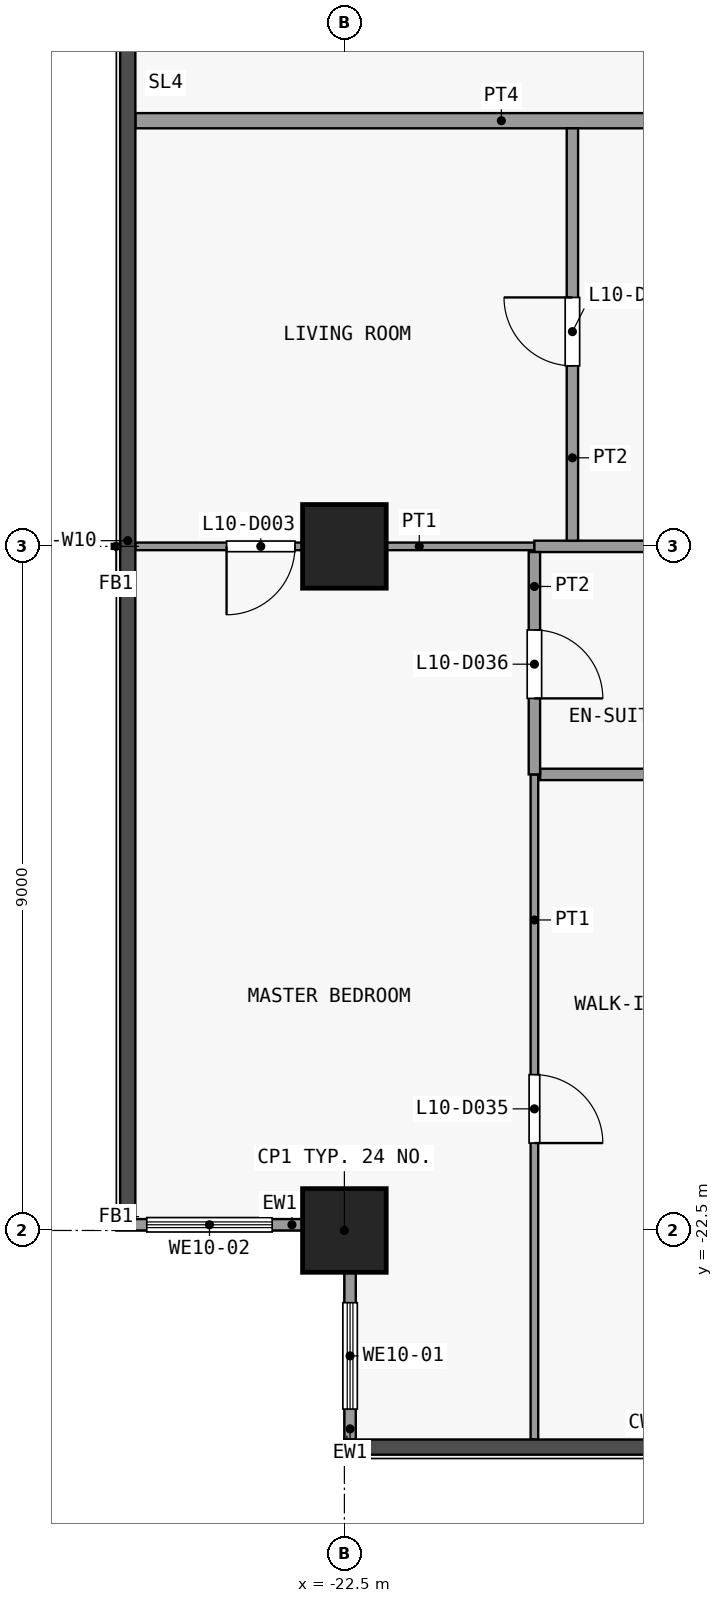
"""IFC4 building model, lengths in metres.
Left out: names, types, materials, properties, quantities, classifications, styles, units other than length and angle.
Written with IfcOpenShell. Run it as: python <this file> out.ifc"""

import sys

from ifc_helpers import new_model, si_unit, direction, frame, frame_2d, origin, origin_2d, place, context, subcontext, project, spatial, rectangle, extrude, element, fill, save


model = new_model("IFC4")
c1 = context("Model", 3, precision=1e-05, world=origin(), true_north=direction((0.0, 1.0)))
c2 = subcontext(c1, "Body", "Model", "MODEL_VIEW")
j1 = project(units=[si_unit("LENGTHUNIT", "METRE"), si_unit("PLANEANGLEUNIT", "RADIAN")], contexts=[c1])
p1 = place(None, origin())
s1 = spatial("IfcSite", under=j1, at=p1, CompositionType="ELEMENT")
p2 = place(p1, origin())
s2 = spatial("IfcBuilding", under=s1, at=p2, CompositionType="ELEMENT")
p3 = place(p2, frame((0.0, 0.0, 46.9)))
s3 = spatial("IfcBuildingStorey", under=s2, at=p3, CompositionType="ELEMENT", Elevation=46.9)
for number, where, z_axis, x_axis in (
    (1, (-22.5, -22.5, 0.0), (0.0, 0.0, 1.0), (1.0, 0.0, 0.0)),
    (2, (-22.5, -13.5, 0.0), (0.0, 0.0, 1.0), (1.0, 0.0, 0.0)),
):
    element("IfcColumn", number, at=place(p3, frame(where, z_axis=z_axis, x_axis=x_axis)), inside=s3, PredefinedType="COLUMN", context=c2, shape_type="SweptSolid", body=[
        extrude(rectangle(XDim=1.1, YDim=1.1, at=origin_2d()), origin(), (0.0, 0.0, 1.0), 3.6),
    ])
p4 = place(p3, frame((-22.425, -25.25, 0.0), z_axis=(0.0, 0.0, 1.0), x_axis=(0.0, 1.0, 0.0)))
e3 = element("IfcWall", 3, at=p4, inside=s3, PredefinedType="SOLIDWALL", context=c2, shape_type="SweptSolid", body=[
    extrude(rectangle(XDim=2.2, YDim=0.15, at=frame_2d((1.1, 0.0))), origin(), (0.0, 0.0, 1.0), 3.3),
])
p5 = place(p4, frame((0.4, 0.0, 0.9)))
e4 = element("IfcOpeningElement", 4, at=p5, cuts=e3, PredefinedType="OPENING", context=c2, shape_type="SweptSolid", body=[
    extrude(rectangle(XDim=1.4, YDim=2.4, at=frame_2d((0.7, 1.2))), frame((0.0, 0.085, 0.0), z_axis=(0.0, -1.0, 0.0), x_axis=(1.0, 0.0, 0.0)), (0.0, 0.0, 1.0), 0.17),
])
p6 = place(p3, frame((-23.05, -22.425, 0.0), z_axis=(0.0, 0.0, 1.0), x_axis=(-1.0, 0.0, 0.0)))
e5 = element("IfcWall", 5, at=p6, inside=s3, PredefinedType="SOLIDWALL", context=c2, shape_type="SweptSolid", body=[
    extrude(rectangle(XDim=2.45, YDim=0.15, at=frame_2d((1.225, 0.0))), origin(), (0.0, 0.0, 1.0), 3.3),
])
p7 = place(p6, frame((0.4, 0.0, 0.9)))
e6 = element("IfcOpeningElement", 6, at=p7, cuts=e5, PredefinedType="OPENING", context=c2, shape_type="SweptSolid", body=[
    extrude(rectangle(XDim=1.65, YDim=2.4, at=frame_2d((0.825, 1.2))), frame((0.0, 0.085, 0.0), z_axis=(0.0, -1.0, 0.0), x_axis=(1.0, 0.0, 0.0)), (0.0, 0.0, 1.0), 0.17),
])
p8 = place(p3, frame((-19.925, -16.5, 0.0), z_axis=(0.0, 0.0, 1.0), x_axis=(1.0, 0.0, 0.0)))
e7 = element("IfcWall", 7, at=p8, inside=s3, PredefinedType="PARTITIONING", context=c2, shape_type="SweptSolid", body=[
    extrude(rectangle(XDim=3.35, YDim=0.15, at=frame_2d((1.675, 0.0))), origin(), (0.0, 0.0, 1.0), 3.3),
])
p9 = place(p3, frame((-25.25, -13.5, 0.0), z_axis=(0.0, 0.0, 1.0), x_axis=(1.0, 0.0, 0.0)))
e8 = element("IfcWall", 8, at=p9, inside=s3, PredefinedType="PARTITIONING", context=c2, shape_type="SweptSolid", body=[
    extrude(rectangle(XDim=5.25, YDim=0.1, at=frame_2d((2.625, 0.0))), origin(), (0.0, 0.0, 1.0), 3.3),
])
p10 = place(p9, frame((1.2, 0.0, 0.0)))
e9 = element("IfcOpeningElement", 9, at=p10, cuts=e8, PredefinedType="OPENING", context=c2, shape_type="SweptSolid", body=[
    extrude(rectangle(XDim=0.9, YDim=2.1, at=frame_2d((0.45, 1.05))), frame((0.0, 0.06, 0.0), z_axis=(0.0, -1.0, 0.0), x_axis=(1.0, 0.0, 0.0)), (0.0, 0.0, 1.0), 0.12),
])
p11 = place(p3, frame((-20.0, -13.5, 0.0), z_axis=(0.0, 0.0, 1.0), x_axis=(1.0, 0.0, 0.0)))
e10 = element("IfcWall", 10, at=p11, inside=s3, PredefinedType="PARTITIONING", context=c2, shape_type="SweptSolid", body=[
    extrude(rectangle(XDim=3.425, YDim=0.15, at=frame_2d((1.712, 0.0))), origin(), (0.0, 0.0, 1.0), 3.3),
])
p12 = place(p3, frame((-25.25, -7.9, 0.0), z_axis=(0.0, 0.0, 1.0), x_axis=(1.0, 0.0, 0.0)))
e11 = element("IfcWall", 11, at=p12, inside=s3, PredefinedType="PARTITIONING", context=c2, shape_type="SweptSolid", body=[
    extrude(rectangle(XDim=11.75, YDim=0.2, at=frame_2d((5.875, 0.0))), origin(), (0.0, 0.0, 1.0), 3.3),
])
p13 = place(p12, frame((9.75, 0.0, 0.0)))
e12 = element("IfcOpeningElement", 12, at=p13, cuts=e11, PredefinedType="OPENING", context=c2, shape_type="SweptSolid", body=[
    extrude(rectangle(XDim=1.0, YDim=2.1, at=frame_2d((0.5, 1.05))), frame((0.0, 0.11, 0.0), z_axis=(0.0, -1.0, 0.0), x_axis=(1.0, 0.0, 0.0)), (0.0, 0.0, 1.0), 0.22),
])
p14 = place(p3, frame((-20.0, -25.25, 0.0), z_axis=(0.0, 0.0, 1.0), x_axis=(0.0, 1.0, 0.0)))
e13 = element("IfcWall", 13, at=p14, inside=s3, PredefinedType="PARTITIONING", context=c2, shape_type="SweptSolid", body=[
    extrude(rectangle(XDim=8.75, YDim=0.1, at=frame_2d((4.375, 0.0))), origin(), (0.0, 0.0, 1.0), 3.3),
])
p15 = place(p14, frame((3.9, 0.0, 0.0)))
e14 = element("IfcOpeningElement", 14, at=p15, cuts=e13, PredefinedType="OPENING", context=c2, shape_type="SweptSolid", body=[
    extrude(rectangle(XDim=0.9, YDim=2.1, at=frame_2d((0.45, 1.05))), frame((0.0, 0.06, 0.0), z_axis=(0.0, -1.0, 0.0), x_axis=(1.0, 0.0, 0.0)), (0.0, 0.0, 1.0), 0.12),
])
p16 = place(p3, frame((-20.0, -16.5, 0.0), z_axis=(0.0, 0.0, 1.0), x_axis=(0.0, 1.0, 0.0)))
e15 = element("IfcWall", 15, at=p16, inside=s3, PredefinedType="PARTITIONING", context=c2, shape_type="SweptSolid", body=[
    extrude(rectangle(XDim=2.925, YDim=0.15, at=frame_2d((1.462, 0.0))), origin(), (0.0, 0.0, 1.0), 3.3),
])
p17 = place(p16, frame((1.0, 0.0, 0.0)))
e16 = element("IfcOpeningElement", 16, at=p17, cuts=e15, PredefinedType="OPENING", context=c2, shape_type="SweptSolid", body=[
    extrude(rectangle(XDim=0.9, YDim=2.1, at=frame_2d((0.45, 1.05))), frame((0.0, 0.085, 0.0), z_axis=(0.0, -1.0, 0.0), x_axis=(1.0, 0.0, 0.0)), (0.0, 0.0, 1.0), 0.17),
])
p18 = place(p3, frame((-19.5, -13.425, 0.0), z_axis=(0.0, 0.0, 1.0), x_axis=(0.0, 1.0, 0.0)))
e17 = element("IfcWall", 17, at=p18, inside=s3, PredefinedType="PARTITIONING", context=c2, shape_type="SweptSolid", body=[
    extrude(rectangle(XDim=5.425, YDim=0.15, at=frame_2d((2.712, 0.0))), origin(), (0.0, 0.0, 1.0), 3.3),
])
p19 = place(p18, frame((2.3, 0.0, 0.0)))
e18 = element("IfcOpeningElement", 18, at=p19, cuts=e17, PredefinedType="OPENING", context=c2, shape_type="SweptSolid", body=[
    extrude(rectangle(XDim=0.9, YDim=2.1, at=frame_2d((0.45, 1.05))), frame((0.0, 0.085, 0.0), z_axis=(0.0, -1.0, 0.0), x_axis=(1.0, 0.0, 0.0)), (0.0, 0.0, 1.0), 0.17),
])
p20 = place(p5, origin())
e19 = element("IfcWindow", 19, at=p20, inside=s3, PartitioningType="SINGLE_PANEL", PredefinedType="WINDOW", context=c2, shape_type="SweptSolid", body=[
    extrude(rectangle(XDim=1.4, YDim=2.4, at=frame_2d((0.7, 1.2))), frame((0.0, 0.03, 0.0), z_axis=(0.0, -1.0, 0.0), x_axis=(1.0, 0.0, 0.0)), (0.0, 0.0, 1.0), 0.06),
])
fill(e4, e19)
p21 = place(p7, origin())
e20 = element("IfcWindow", 20, at=p21, inside=s3, PartitioningType="SINGLE_PANEL", PredefinedType="WINDOW", context=c2, shape_type="SweptSolid", body=[
    extrude(rectangle(XDim=1.65, YDim=2.4, at=frame_2d((0.825, 1.2))), frame((0.0, 0.03, 0.0), z_axis=(0.0, -1.0, 0.0), x_axis=(1.0, 0.0, 0.0)), (0.0, 0.0, 1.0), 0.06),
])
fill(e6, e20)
p22 = place(p10, origin())
e21 = element("IfcDoor", 21, at=p22, inside=s3, OperationType="SINGLE_SWING_LEFT", PredefinedType="DOOR", context=c2, shape_type="SweptSolid", body=[
    extrude(rectangle(XDim=0.9, YDim=2.1, at=frame_2d((0.45, 1.05))), frame((0.0, 0.025, 0.0), z_axis=(0.0, -1.0, 0.0), x_axis=(1.0, 0.0, 0.0)), (0.0, 0.0, 1.0), 0.05),
])
fill(e9, e21)
p23 = place(p15, origin())
e22 = element("IfcDoor", 22, at=p23, inside=s3, OperationType="SINGLE_SWING_LEFT", PredefinedType="DOOR", context=c2, shape_type="SweptSolid", body=[
    extrude(rectangle(XDim=0.9, YDim=2.1, at=frame_2d((0.45, 1.05))), frame((0.0, 0.025, 0.0), z_axis=(0.0, -1.0, 0.0), x_axis=(1.0, 0.0, 0.0)), (0.0, 0.0, 1.0), 0.05),
])
fill(e14, e22)
p24 = place(p17, origin())
e23 = element("IfcDoor", 23, at=p24, inside=s3, OperationType="SINGLE_SWING_LEFT", PredefinedType="DOOR", context=c2, shape_type="SweptSolid", body=[
    extrude(rectangle(XDim=0.9, YDim=2.1, at=frame_2d((0.45, 1.05))), frame((0.0, 0.025, 0.0), z_axis=(0.0, -1.0, 0.0), x_axis=(1.0, 0.0, 0.0)), (0.0, 0.0, 1.0), 0.05),
])
fill(e16, e23)
p25 = place(p19, origin())
e24 = element("IfcDoor", 24, at=p25, inside=s3, OperationType="SINGLE_SWING_LEFT", PredefinedType="DOOR", context=c2, shape_type="SweptSolid", body=[
    extrude(rectangle(XDim=0.9, YDim=2.1, at=frame_2d((0.45, 1.05))), frame((0.0, 0.025, 0.0), z_axis=(0.0, -1.0, 0.0), x_axis=(1.0, 0.0, 0.0)), (0.0, 0.0, 1.0), 0.05),
])
fill(e18, e24)
save(model, sys.argv[1])
